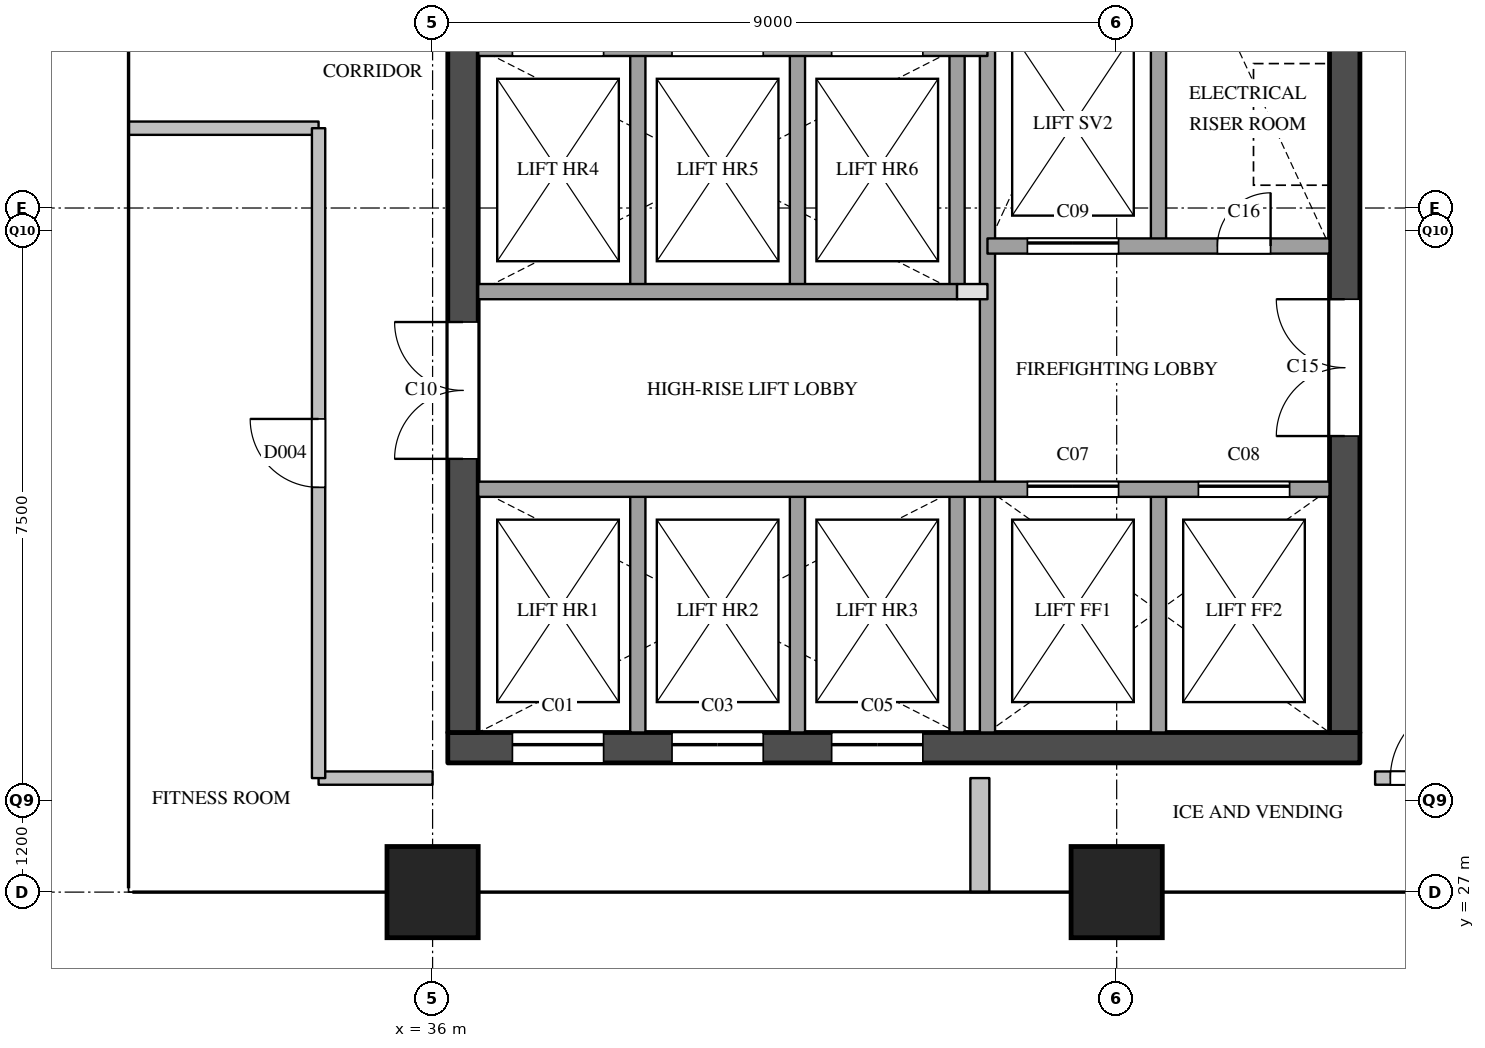
"""IFC4 building model, lengths in metres.
Left out: names, types, materials, properties, quantities, classifications, styles, units other than length and angle.
Written with IfcOpenShell. Run it as: python <this file> out.ifc"""

import sys

from ifc_helpers import new_model, si_unit, direction, frame, frame_2d, origin, origin_2d, place, context, subcontext, project, spatial, rectangle, extrude, element, fill, save


model = new_model("IFC4")
c1 = context("Model", 3, precision=1e-05, world=origin(), true_north=direction((0.0, 1.0)))
c2 = subcontext(c1, "Body", "Model", "MODEL_VIEW")
j1 = project(units=[si_unit("LENGTHUNIT", "METRE"), si_unit("PLANEANGLEUNIT", "RADIAN")], contexts=[c1])
p1 = place(None, origin())
s1 = spatial("IfcSite", under=j1, at=p1, CompositionType="ELEMENT")
p2 = place(p1, origin())
s2 = spatial("IfcBuilding", under=s1, at=p2, CompositionType="ELEMENT")
p3 = place(p2, frame((0.0, 0.0, 207.2)))
s3 = spatial("IfcBuildingStorey", under=s2, at=p3, CompositionType="ELEMENT", Elevation=207.2)
for number, where, z_axis, x_axis in (
    (1, (36.0, 27.0, 0.0), (0.0, 0.0, 1.0), (1.0, 0.0, 0.0)),
    (2, (45.0, 27.0, 0.0), (0.0, 0.0, 1.0), (1.0, 0.0, 0.0)),
):
    element("IfcColumn", number, at=place(p3, frame(where, z_axis=z_axis, x_axis=x_axis)), inside=s3, PredefinedType="COLUMN", context=c2, shape_type="SweptSolid", body=[
        extrude(rectangle(XDim=1.2, YDim=1.2, at=origin_2d()), origin(), (0.0, 0.0, 1.0), 3.9),
    ])
p4 = place(p3, frame((36.2, 28.9, 0.0), z_axis=(0.0, 0.0, 1.0), x_axis=(1.0, 0.0, 0.0)))
e3 = element("IfcWall", 3, at=p4, inside=s3, PredefinedType="SHEAR", context=c2, shape_type="SweptSolid", body=[
    extrude(rectangle(XDim=12.0, YDim=0.4, at=frame_2d((6.0, 0.0))), origin(), (0.0, 0.0, 1.0), 3.6),
])
p5 = place(p4, frame((0.85, 0.0, 0.0)))
e4 = element("IfcOpeningElement", 4, at=p5, cuts=e3, PredefinedType="OPENING", context=c2, shape_type="SweptSolid", body=[
    extrude(rectangle(XDim=1.2, YDim=2.1, at=frame_2d((0.6, 1.05))), frame((0.0, 0.21, 0.0), z_axis=(0.0, -1.0, 0.0), x_axis=(1.0, 0.0, 0.0)), (0.0, 0.0, 1.0), 0.42),
])
p6 = place(p4, frame((2.95, 0.0, 0.0)))
e5 = element("IfcOpeningElement", 5, at=p6, cuts=e3, PredefinedType="OPENING", context=c2, shape_type="SweptSolid", body=[
    extrude(rectangle(XDim=1.2, YDim=2.1, at=frame_2d((0.6, 1.05))), frame((0.0, 0.21, 0.0), z_axis=(0.0, -1.0, 0.0), x_axis=(1.0, 0.0, 0.0)), (0.0, 0.0, 1.0), 0.42),
])
p7 = place(p4, frame((5.05, 0.0, 0.0)))
e6 = element("IfcOpeningElement", 6, at=p7, cuts=e3, PredefinedType="OPENING", context=c2, shape_type="SweptSolid", body=[
    extrude(rectangle(XDim=1.2, YDim=2.1, at=frame_2d((0.6, 1.05))), frame((0.0, 0.21, 0.0), z_axis=(0.0, -1.0, 0.0), x_axis=(1.0, 0.0, 0.0)), (0.0, 0.0, 1.0), 0.42),
])
p8 = place(p3, frame((36.4, 29.1, 0.0), z_axis=(0.0, 0.0, 1.0), x_axis=(0.0, 1.0, 0.0)))
e7 = element("IfcWall", 7, at=p8, inside=s3, PredefinedType="SHEAR", context=c2, shape_type="SweptSolid", body=[
    extrude(rectangle(XDim=20.3, YDim=0.4, at=frame_2d((10.15, 0.0))), origin(), (0.0, 0.0, 1.0), 3.6),
])
p9 = place(p8, frame((3.6, 0.0, 0.0)))
e8 = element("IfcOpeningElement", 8, at=p9, cuts=e7, PredefinedType="OPENING", context=c2, shape_type="SweptSolid", body=[
    extrude(rectangle(XDim=1.8, YDim=2.1, at=frame_2d((0.9, 1.05))), frame((0.0, 0.21, 0.0), z_axis=(0.0, -1.0, 0.0), x_axis=(1.0, 0.0, 0.0)), (0.0, 0.0, 1.0), 0.42),
])
p10 = place(p8, frame((16.4, 0.0, 0.0)))
e9 = element("IfcOpeningElement", 9, at=p10, cuts=e7, PredefinedType="OPENING", context=c2, shape_type="SweptSolid", body=[
    extrude(rectangle(XDim=1.0, YDim=2.1, at=frame_2d((0.5, 1.05))), frame((0.0, 0.21, 0.0), z_axis=(0.0, -1.0, 0.0), x_axis=(1.0, 0.0, 0.0)), (0.0, 0.0, 1.0), 0.42),
])
p11 = place(p3, frame((48.0, 29.1, 0.0), z_axis=(0.0, 0.0, 1.0), x_axis=(0.0, 1.0, 0.0)))
e10 = element("IfcWall", 10, at=p11, inside=s3, PredefinedType="SHEAR", context=c2, shape_type="SweptSolid", body=[
    extrude(rectangle(XDim=20.3, YDim=0.4, at=frame_2d((10.15, 0.0))), origin(), (0.0, 0.0, 1.0), 3.6),
])
p12 = place(p11, frame((12.5, 0.0, 0.0)))
e11 = element("IfcOpeningElement", 11, at=p12, cuts=e10, PredefinedType="OPENING", context=c2, shape_type="SweptSolid", body=[
    extrude(rectangle(XDim=0.7, YDim=2.1, at=frame_2d((0.35, 1.05))), frame((0.0, 0.21, 0.0), z_axis=(0.0, -1.0, 0.0), x_axis=(1.0, 0.0, 0.0)), (0.0, 0.0, 1.0), 0.42),
])
p13 = place(p11, frame((3.9, 0.0, 0.0)))
e12 = element("IfcOpeningElement", 12, at=p13, cuts=e10, PredefinedType="OPENING", context=c2, shape_type="SweptSolid", body=[
    extrude(rectangle(XDim=1.8, YDim=2.1, at=frame_2d((0.9, 1.05))), frame((0.0, 0.21, 0.0), z_axis=(0.0, -1.0, 0.0), x_axis=(1.0, 0.0, 0.0)), (0.0, 0.0, 1.0), 0.42),
])
p14 = place(p3, frame((38.7, 29.1, 0.0), z_axis=(0.0, 0.0, 1.0), x_axis=(0.0, 1.0, 0.0)))
e13 = element("IfcWall", 13, at=p14, inside=s3, PredefinedType="SOLIDWALL", context=c2, shape_type="SweptSolid", body=[
    extrude(rectangle(XDim=3.2, YDim=0.2, at=frame_2d((1.6, 0.0))), origin(), (0.0, 0.0, 1.0), 3.6),
])
p15 = place(p3, frame((38.7, 34.9, 0.0), z_axis=(0.0, 0.0, 1.0), x_axis=(0.0, 1.0, 0.0)))
e14 = element("IfcWall", 14, at=p15, inside=s3, PredefinedType="SOLIDWALL", context=c2, shape_type="SweptSolid", body=[
    extrude(rectangle(XDim=3.2, YDim=0.2, at=frame_2d((1.6, 0.0))), origin(), (0.0, 0.0, 1.0), 3.6),
])
p16 = place(p3, frame((40.8, 29.1, 0.0), z_axis=(0.0, 0.0, 1.0), x_axis=(0.0, 1.0, 0.0)))
e15 = element("IfcWall", 15, at=p16, inside=s3, PredefinedType="SOLIDWALL", context=c2, shape_type="SweptSolid", body=[
    extrude(rectangle(XDim=3.2, YDim=0.2, at=frame_2d((1.6, 0.0))), origin(), (0.0, 0.0, 1.0), 3.6),
])
p17 = place(p3, frame((40.8, 34.9, 0.0), z_axis=(0.0, 0.0, 1.0), x_axis=(0.0, 1.0, 0.0)))
e16 = element("IfcWall", 16, at=p17, inside=s3, PredefinedType="SOLIDWALL", context=c2, shape_type="SweptSolid", body=[
    extrude(rectangle(XDim=3.2, YDim=0.2, at=frame_2d((1.6, 0.0))), origin(), (0.0, 0.0, 1.0), 3.6),
])
p18 = place(p3, frame((42.9, 29.1, 0.0), z_axis=(0.0, 0.0, 1.0), x_axis=(0.0, 1.0, 0.0)))
e17 = element("IfcWall", 17, at=p18, inside=s3, PredefinedType="SOLIDWALL", context=c2, shape_type="SweptSolid", body=[
    extrude(rectangle(XDim=3.2, YDim=0.2, at=frame_2d((1.6, 0.0))), origin(), (0.0, 0.0, 1.0), 3.6),
])
p19 = place(p3, frame((42.9, 34.9, 0.0), z_axis=(0.0, 0.0, 1.0), x_axis=(0.0, 1.0, 0.0)))
e18 = element("IfcWall", 18, at=p19, inside=s3, PredefinedType="SOLIDWALL", context=c2, shape_type="SweptSolid", body=[
    extrude(rectangle(XDim=3.2, YDim=0.2, at=frame_2d((1.6, 0.0))), origin(), (0.0, 0.0, 1.0), 3.6),
])
p20 = place(p3, frame((43.3, 29.1, 0.0), z_axis=(0.0, 0.0, 1.0), x_axis=(0.0, 1.0, 0.0)))
e19 = element("IfcWall", 19, at=p20, inside=s3, PredefinedType="SOLIDWALL", context=c2, shape_type="SweptSolid", body=[
    extrude(rectangle(XDim=9.9, YDim=0.2, at=frame_2d((4.95, 0.0))), origin(), (0.0, 0.0, 1.0), 3.6),
])
for number, where, z_axis, x_axis in (
    (20, (45.55, 29.1, 0.0), (0.0, 0.0, 1.0), (0.0, 1.0, 0.0)),
    (21, (45.55, 35.5, 0.0), (0.0, 0.0, 1.0), (0.0, 1.0, 0.0)),
):
    element("IfcWall", number, at=place(p3, frame(where, z_axis=z_axis, x_axis=x_axis)), inside=s3, PredefinedType="SOLIDWALL", context=c2, shape_type="SweptSolid", body=[
        extrude(rectangle(XDim=3.2, YDim=0.2, at=frame_2d((1.6, 0.0))), origin(), (0.0, 0.0, 1.0), 3.6),
    ])
p21 = place(p3, frame((36.6, 32.3, 0.0), z_axis=(0.0, 0.0, 1.0), x_axis=(1.0, 0.0, 0.0)))
e22 = element("IfcWall", 22, at=p21, inside=s3, PredefinedType="SOLIDWALL", context=c2, shape_type="SweptSolid", body=[
    extrude(rectangle(XDim=11.2, YDim=0.2, at=frame_2d((5.6, 0.0))), origin(), (0.0, 0.0, 1.0), 3.6),
])
p22 = place(p21, frame((7.225, 0.0, 0.0)))
e23 = element("IfcOpeningElement", 23, at=p22, cuts=e22, PredefinedType="OPENING", context=c2, shape_type="SweptSolid", body=[
    extrude(rectangle(XDim=1.2, YDim=2.1, at=frame_2d((0.6, 1.05))), frame((0.0, 0.11, 0.0), z_axis=(0.0, -1.0, 0.0), x_axis=(1.0, 0.0, 0.0)), (0.0, 0.0, 1.0), 0.22),
])
p23 = place(p21, frame((9.475, 0.0, 0.0)))
e24 = element("IfcOpeningElement", 24, at=p23, cuts=e22, PredefinedType="OPENING", context=c2, shape_type="SweptSolid", body=[
    extrude(rectangle(XDim=1.2, YDim=2.1, at=frame_2d((0.6, 1.05))), frame((0.0, 0.11, 0.0), z_axis=(0.0, -1.0, 0.0), x_axis=(1.0, 0.0, 0.0)), (0.0, 0.0, 1.0), 0.22),
])
p24 = place(p3, frame((42.9, 34.9, 0.0), z_axis=(0.0, 0.0, 1.0), x_axis=(1.0, 0.0, 0.0)))
e25 = element("IfcWall", 25, at=p24, inside=s3, PredefinedType="PARTITIONING", context=c2, shape_type="SweptSolid", body=[
    extrude(rectangle(XDim=0.4, YDim=0.2, at=frame_2d((0.2, 0.0))), origin(), (0.0, 0.0, 1.0), 3.6),
])
p25 = place(p3, frame((36.6, 34.9, 0.0), z_axis=(0.0, 0.0, 1.0), x_axis=(1.0, 0.0, 0.0)))
e26 = element("IfcWall", 26, at=p25, inside=s3, PredefinedType="SOLIDWALL", context=c2, shape_type="SweptSolid", body=[
    extrude(rectangle(XDim=6.3, YDim=0.2, at=frame_2d((3.15, 0.0))), origin(), (0.0, 0.0, 1.0), 3.6),
])
p26 = place(p3, frame((43.3, 35.5, 0.0), z_axis=(0.0, 0.0, 1.0), x_axis=(1.0, 0.0, 0.0)))
e27 = element("IfcWall", 27, at=p26, inside=s3, PredefinedType="SOLIDWALL", context=c2, shape_type="SweptSolid", body=[
    extrude(rectangle(XDim=4.5, YDim=0.2, at=frame_2d((2.25, 0.0))), origin(), (0.0, 0.0, 1.0), 3.6),
])
p27 = place(p26, frame((0.525, 0.0, 0.0)))
e28 = element("IfcOpeningElement", 28, at=p27, cuts=e27, PredefinedType="OPENING", context=c2, shape_type="SweptSolid", body=[
    extrude(rectangle(XDim=1.2, YDim=2.1, at=frame_2d((0.6, 1.05))), frame((0.0, 0.11, 0.0), z_axis=(0.0, -1.0, 0.0), x_axis=(1.0, 0.0, 0.0)), (0.0, 0.0, 1.0), 0.22),
])
p28 = place(p26, frame((3.025, 0.0, 0.0)))
e29 = element("IfcOpeningElement", 29, at=p28, cuts=e27, PredefinedType="OPENING", context=c2, shape_type="SweptSolid", body=[
    extrude(rectangle(XDim=0.7, YDim=2.1, at=frame_2d((0.35, 1.05))), frame((0.0, 0.11, 0.0), z_axis=(0.0, -1.0, 0.0), x_axis=(1.0, 0.0, 0.0)), (0.0, 0.0, 1.0), 0.22),
])
p29 = place(p3, frame((36.6, 38.1, 0.0), z_axis=(0.0, 0.0, 1.0), x_axis=(1.0, 0.0, 0.0)))
e30 = element("IfcWall", 30, at=p29, inside=s3, PredefinedType="SOLIDWALL", context=c2, shape_type="SweptSolid", body=[
    extrude(rectangle(XDim=6.7, YDim=0.2, at=frame_2d((3.35, 0.0))), origin(), (0.0, 0.0, 1.0), 3.6),
])
p30 = place(p29, frame((0.45, 0.0, 0.0)))
e31 = element("IfcOpeningElement", 31, at=p30, cuts=e30, PredefinedType="OPENING", context=c2, shape_type="SweptSolid", body=[
    extrude(rectangle(XDim=1.2, YDim=2.1, at=frame_2d((0.6, 1.05))), frame((0.0, 0.11, 0.0), z_axis=(0.0, -1.0, 0.0), x_axis=(1.0, 0.0, 0.0)), (0.0, 0.0, 1.0), 0.22),
])
p31 = place(p29, frame((2.55, 0.0, 0.0)))
e32 = element("IfcOpeningElement", 32, at=p31, cuts=e30, PredefinedType="OPENING", context=c2, shape_type="SweptSolid", body=[
    extrude(rectangle(XDim=1.2, YDim=2.1, at=frame_2d((0.6, 1.05))), frame((0.0, 0.11, 0.0), z_axis=(0.0, -1.0, 0.0), x_axis=(1.0, 0.0, 0.0)), (0.0, 0.0, 1.0), 0.22),
])
p32 = place(p29, frame((4.65, 0.0, 0.0)))
e33 = element("IfcOpeningElement", 33, at=p32, cuts=e30, PredefinedType="OPENING", context=c2, shape_type="SweptSolid", body=[
    extrude(rectangle(XDim=1.2, YDim=2.1, at=frame_2d((0.6, 1.05))), frame((0.0, 0.11, 0.0), z_axis=(0.0, -1.0, 0.0), x_axis=(1.0, 0.0, 0.0)), (0.0, 0.0, 1.0), 0.22),
])
p33 = place(p3, frame((34.5, 28.5, 0.0), z_axis=(0.0, 0.0, 1.0), x_axis=(1.0, 0.0, 0.0)))
e34 = element("IfcWall", 34, at=p33, inside=s3, PredefinedType="PARTITIONING", context=c2, shape_type="SweptSolid", body=[
    extrude(rectangle(XDim=1.5, YDim=0.175, at=frame_2d((0.75, 0.0))), origin(), (0.0, 0.0, 1.0), 3.6),
])
p34 = place(p3, frame((48.4, 28.5, 0.0), z_axis=(0.0, 0.0, 1.0), x_axis=(1.0, 0.0, 0.0)))
e35 = element("IfcWall", 35, at=p34, inside=s3, PredefinedType="PARTITIONING", context=c2, shape_type="SweptSolid", body=[
    extrude(rectangle(XDim=1.5, YDim=0.175, at=frame_2d((0.75, 0.0))), origin(), (0.0, 0.0, 1.0), 3.6),
])
p35 = place(p34, frame((0.2, 0.0, 0.0)))
e36 = element("IfcOpeningElement", 36, at=p35, cuts=e35, PredefinedType="OPENING", context=c2, shape_type="SweptSolid", body=[
    extrude(rectangle(XDim=1.0, YDim=2.1, at=frame_2d((0.5, 1.05))), frame((0.0, 0.097, 0.0), z_axis=(0.0, -1.0, 0.0), x_axis=(1.0, 0.0, 0.0)), (0.0, 0.0, 1.0), 0.195),
])
p36 = place(p3, frame((32.0, 37.05, 0.0), z_axis=(0.0, 0.0, 1.0), x_axis=(1.0, 0.0, 0.0)))
e37 = element("IfcWall", 37, at=p36, inside=s3, PredefinedType="PARTITIONING", context=c2, shape_type="SweptSolid", body=[
    extrude(rectangle(XDim=2.5, YDim=0.175, at=frame_2d((1.25, 0.0))), origin(), (0.0, 0.0, 1.0), 3.6),
])
p37 = place(p3, frame((34.5, 28.5, 0.0), z_axis=(0.0, 0.0, 1.0), x_axis=(0.0, 1.0, 0.0)))
e38 = element("IfcWall", 38, at=p37, inside=s3, PredefinedType="PARTITIONING", context=c2, shape_type="SweptSolid", body=[
    extrude(rectangle(XDim=8.55, YDim=0.175, at=frame_2d((4.275, 0.0))), origin(), (0.0, 0.0, 1.0), 3.6),
])
p38 = place(p37, frame((3.825, 0.0, 0.0)))
e39 = element("IfcOpeningElement", 39, at=p38, cuts=e38, PredefinedType="OPENING", context=c2, shape_type="SweptSolid", body=[
    extrude(rectangle(XDim=0.9, YDim=2.1, at=frame_2d((0.45, 1.05))), frame((0.0, 0.097, 0.0), z_axis=(0.0, -1.0, 0.0), x_axis=(1.0, 0.0, 0.0)), (0.0, 0.0, 1.0), 0.195),
])
p39 = place(p3, frame((43.2, 27.0, 0.0), z_axis=(0.0, 0.0, 1.0), x_axis=(0.0, 1.0, 0.0)))
e40 = element("IfcWall", 40, at=p39, inside=s3, PredefinedType="PARTITIONING", context=c2, shape_type="SweptSolid", body=[
    extrude(rectangle(XDim=1.5, YDim=0.25, at=frame_2d((0.75, 0.0))), origin(), (0.0, 0.0, 1.0), 2.6),
])
p40 = place(p5, origin())
e41 = element("IfcDoor", 41, at=p40, inside=s3, OperationType="SLIDING_TO_LEFT", PredefinedType="DOOR", context=c2, shape_type="SweptSolid", body=[
    extrude(rectangle(XDim=1.2, YDim=2.1, at=frame_2d((0.6, 1.05))), frame((0.0, 0.025, 0.0), z_axis=(0.0, -1.0, 0.0), x_axis=(1.0, 0.0, 0.0)), (0.0, 0.0, 1.0), 0.05),
])
fill(e4, e41)
p41 = place(p6, origin())
e42 = element("IfcDoor", 42, at=p41, inside=s3, OperationType="SLIDING_TO_LEFT", PredefinedType="DOOR", context=c2, shape_type="SweptSolid", body=[
    extrude(rectangle(XDim=1.2, YDim=2.1, at=frame_2d((0.6, 1.05))), frame((0.0, 0.025, 0.0), z_axis=(0.0, -1.0, 0.0), x_axis=(1.0, 0.0, 0.0)), (0.0, 0.0, 1.0), 0.05),
])
fill(e5, e42)
p42 = place(p7, origin())
e43 = element("IfcDoor", 43, at=p42, inside=s3, OperationType="SLIDING_TO_LEFT", PredefinedType="DOOR", context=c2, shape_type="SweptSolid", body=[
    extrude(rectangle(XDim=1.2, YDim=2.1, at=frame_2d((0.6, 1.05))), frame((0.0, 0.025, 0.0), z_axis=(0.0, -1.0, 0.0), x_axis=(1.0, 0.0, 0.0)), (0.0, 0.0, 1.0), 0.05),
])
fill(e6, e43)
p43 = place(p22, origin())
e44 = element("IfcDoor", 44, at=p43, inside=s3, OperationType="SLIDING_TO_LEFT", PredefinedType="DOOR", context=c2, shape_type="SweptSolid", body=[
    extrude(rectangle(XDim=1.2, YDim=2.1, at=frame_2d((0.6, 1.05))), frame((0.0, 0.025, 0.0), z_axis=(0.0, -1.0, 0.0), x_axis=(1.0, 0.0, 0.0)), (0.0, 0.0, 1.0), 0.05),
])
fill(e23, e44)
p44 = place(p23, origin())
e45 = element("IfcDoor", 45, at=p44, inside=s3, OperationType="SLIDING_TO_LEFT", PredefinedType="DOOR", context=c2, shape_type="SweptSolid", body=[
    extrude(rectangle(XDim=1.2, YDim=2.1, at=frame_2d((0.6, 1.05))), frame((0.0, 0.025, 0.0), z_axis=(0.0, -1.0, 0.0), x_axis=(1.0, 0.0, 0.0)), (0.0, 0.0, 1.0), 0.05),
])
fill(e24, e45)
p45 = place(p27, origin())
e46 = element("IfcDoor", 46, at=p45, inside=s3, OperationType="SLIDING_TO_LEFT", PredefinedType="DOOR", context=c2, shape_type="SweptSolid", body=[
    extrude(rectangle(XDim=1.2, YDim=2.1, at=frame_2d((0.6, 1.05))), frame((0.0, 0.025, 0.0), z_axis=(0.0, -1.0, 0.0), x_axis=(1.0, 0.0, 0.0)), (0.0, 0.0, 1.0), 0.05),
])
fill(e28, e46)
p46 = place(p9, origin())
e47 = element("IfcDoor", 47, at=p46, inside=s3, OperationType="DOUBLE_DOOR_SINGLE_SWING", PredefinedType="DOOR", context=c2, shape_type="SweptSolid", body=[
    extrude(rectangle(XDim=1.8, YDim=2.1, at=frame_2d((0.9, 1.05))), frame((0.0, 0.025, 0.0), z_axis=(0.0, -1.0, 0.0), x_axis=(1.0, 0.0, 0.0)), (0.0, 0.0, 1.0), 0.05),
])
fill(e8, e47)
p47 = place(p13, origin())
e48 = element("IfcDoor", 48, at=p47, inside=s3, OperationType="DOUBLE_DOOR_SINGLE_SWING", PredefinedType="DOOR", context=c2, shape_type="SweptSolid", body=[
    extrude(rectangle(XDim=1.8, YDim=2.1, at=frame_2d((0.9, 1.05))), frame((0.0, 0.025, 0.0), z_axis=(0.0, -1.0, 0.0), x_axis=(1.0, 0.0, 0.0)), (0.0, 0.0, 1.0), 0.05),
])
fill(e12, e48)
p48 = place(p28, origin())
e49 = element("IfcDoor", 49, at=p48, inside=s3, OperationType="SINGLE_SWING_RIGHT", PredefinedType="DOOR", context=c2, shape_type="SweptSolid", body=[
    extrude(rectangle(XDim=0.7, YDim=2.1, at=frame_2d((0.35, 1.05))), frame((0.0, 0.025, 0.0), z_axis=(0.0, -1.0, 0.0), x_axis=(1.0, 0.0, 0.0)), (0.0, 0.0, 1.0), 0.05),
])
fill(e29, e49)
p49 = place(p35, origin())
e50 = element("IfcDoor", 50, at=p49, inside=s3, OperationType="SINGLE_SWING_RIGHT", PredefinedType="DOOR", context=c2, shape_type="SweptSolid", body=[
    extrude(rectangle(XDim=1.0, YDim=2.1, at=frame_2d((0.5, 1.05))), frame((0.0, 0.025, 0.0), z_axis=(0.0, -1.0, 0.0), x_axis=(1.0, 0.0, 0.0)), (0.0, 0.0, 1.0), 0.05),
])
fill(e36, e50)
p50 = place(p38, origin())
e51 = element("IfcDoor", 51, at=p50, inside=s3, OperationType="SINGLE_SWING_RIGHT", PredefinedType="DOOR", context=c2, shape_type="SweptSolid", body=[
    extrude(rectangle(XDim=0.9, YDim=2.1, at=frame_2d((0.45, 1.05))), frame((0.0, 0.025, 0.0), z_axis=(0.0, -1.0, 0.0), x_axis=(1.0, 0.0, 0.0)), (0.0, 0.0, 1.0), 0.05),
])
fill(e39, e51)
save(model, sys.argv[1])
